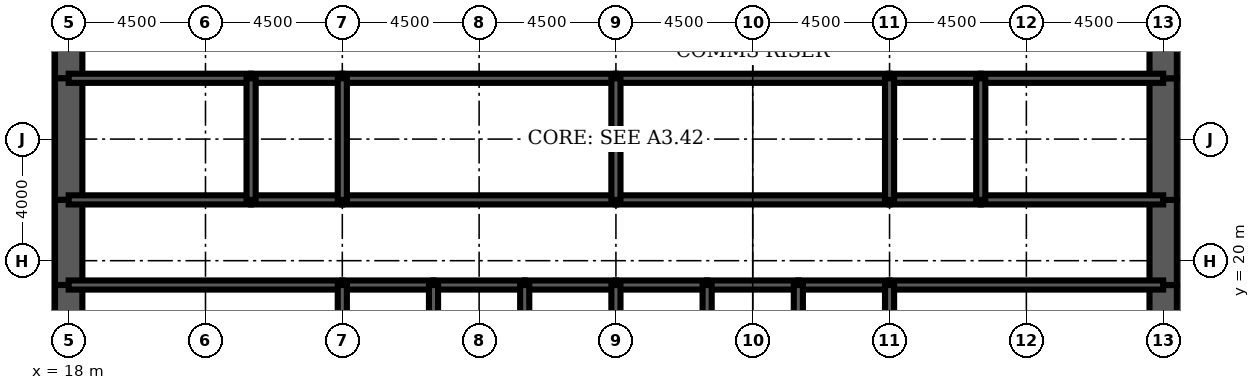
"""IFC4 building model, lengths in metres.
Left out: names, types, materials, properties, quantities, classifications, styles, units other than length and angle.
Written with IfcOpenShell. Run it as: python <this file> out.ifc"""

import sys

from ifc_helpers import new_model, si_unit, direction, frame, frame_2d, origin, place, context, subcontext, project, spatial, rectangle, extrude, element, fill, save


model = new_model("IFC4")
c1 = context("Model", 3, precision=1e-05, world=origin(), true_north=direction((0.0, 1.0)))
c2 = subcontext(c1, "Body", "Model", "MODEL_VIEW")
j1 = project(units=[si_unit("LENGTHUNIT", "METRE"), si_unit("PLANEANGLEUNIT", "RADIAN")], contexts=[c1])
p1 = place(None, origin())
s1 = spatial("IfcSite", under=j1, at=p1, CompositionType="ELEMENT")
p2 = place(p1, origin())
s2 = spatial("IfcBuilding", under=s1, at=p2, CompositionType="ELEMENT")
p3 = place(p2, frame((0.0, 0.0, 180.3)))
s3 = spatial("IfcBuildingStorey", under=s2, at=p3, CompositionType="ELEMENT", Elevation=180.3)
p4 = place(p3, frame((18.0, 28.8, 0.0), z_axis=(0.0, 0.0, 1.0), x_axis=(0.0, -1.0, 0.0)))
e1 = element("IfcWall", 1, at=p4, inside=s3, PredefinedType="SHEAR", context=c2, shape_type="SweptSolid", body=[
    extrude(rectangle(XDim=2.8, YDim=0.9, at=frame_2d((1.4, 0.0))), origin(), (0.0, 0.0, 1.0), 5.5),
])
p5 = place(p4, frame((0.4, 0.0, 0.0)))
e2 = element("IfcOpeningElement", 2, at=p5, cuts=e1, PredefinedType="OPENING", context=c2, shape_type="SweptSolid", body=[
    extrude(rectangle(XDim=1.8, YDim=2.1, at=frame_2d((0.9, 1.05))), frame((0.0, 0.46, 0.0), z_axis=(0.0, -1.0, 0.0), x_axis=(1.0, 0.0, 0.0)), (0.0, 0.0, 1.0), 0.92),
])
p6 = place(p3, frame((18.0, 26.0, 0.0), z_axis=(0.0, 0.0, 1.0), x_axis=(0.0, -1.0, 0.0)))
e3 = element("IfcWall", 3, at=p6, inside=s3, PredefinedType="SHEAR", context=c2, shape_type="SweptSolid", body=[
    extrude(rectangle(XDim=4.0, YDim=0.9, at=frame_2d((2.0, 0.0))), origin(), (0.0, 0.0, 1.0), 5.5),
])
p7 = place(p3, frame((18.0, 22.0, 0.0), z_axis=(0.0, 0.0, 1.0), x_axis=(0.0, -1.0, 0.0)))
e4 = element("IfcWall", 4, at=p7, inside=s3, PredefinedType="SHEAR", context=c2, shape_type="SweptSolid", body=[
    extrude(rectangle(XDim=2.8, YDim=0.9, at=frame_2d((1.4, 0.0))), origin(), (0.0, 0.0, 1.0), 5.5),
])
p8 = place(p7, frame((0.6, 0.0, 0.0)))
e5 = element("IfcOpeningElement", 5, at=p8, cuts=e4, PredefinedType="OPENING", context=c2, shape_type="SweptSolid", body=[
    extrude(rectangle(XDim=1.8, YDim=2.1, at=frame_2d((0.9, 1.05))), frame((0.0, 0.46, 0.0), z_axis=(0.0, -1.0, 0.0), x_axis=(1.0, 0.0, 0.0)), (0.0, 0.0, 1.0), 0.92),
])
for number, where, z_axis, x_axis in (
    (6, (18.0, 19.2, 0.0), (0.0, 0.0, 1.0), (0.0, -1.0, 0.0)),
    (7, (54.0, 16.0, 0.0), (0.0, 0.0, 1.0), (0.0, 1.0, 0.0)),
):
    element("IfcWall", number, at=place(p3, frame(where, z_axis=z_axis, x_axis=x_axis)), inside=s3, PredefinedType="SHEAR", context=c2, shape_type="SweptSolid", body=[
        extrude(rectangle(XDim=3.2, YDim=0.9, at=frame_2d((1.6, 0.0))), origin(), (0.0, 0.0, 1.0), 5.5),
    ])
p9 = place(p3, frame((54.0, 19.2, 0.0), z_axis=(0.0, 0.0, 1.0), x_axis=(0.0, 1.0, 0.0)))
e8 = element("IfcWall", 8, at=p9, inside=s3, PredefinedType="SHEAR", context=c2, shape_type="SweptSolid", body=[
    extrude(rectangle(XDim=2.8, YDim=0.9, at=frame_2d((1.4, 0.0))), origin(), (0.0, 0.0, 1.0), 5.5),
])
p10 = place(p9, frame((0.4, 0.0, 0.0)))
e9 = element("IfcOpeningElement", 9, at=p10, cuts=e8, PredefinedType="OPENING", context=c2, shape_type="SweptSolid", body=[
    extrude(rectangle(XDim=1.8, YDim=2.1, at=frame_2d((0.9, 1.05))), frame((0.0, 0.46, 0.0), z_axis=(0.0, -1.0, 0.0), x_axis=(1.0, 0.0, 0.0)), (0.0, 0.0, 1.0), 0.92),
])
p11 = place(p3, frame((54.0, 22.0, 0.0), z_axis=(0.0, 0.0, 1.0), x_axis=(0.0, 1.0, 0.0)))
e10 = element("IfcWall", 10, at=p11, inside=s3, PredefinedType="SHEAR", context=c2, shape_type="SweptSolid", body=[
    extrude(rectangle(XDim=4.0, YDim=0.9, at=frame_2d((2.0, 0.0))), origin(), (0.0, 0.0, 1.0), 5.5),
])
p12 = place(p3, frame((54.0, 26.0, 0.0), z_axis=(0.0, 0.0, 1.0), x_axis=(0.0, 1.0, 0.0)))
e11 = element("IfcWall", 11, at=p12, inside=s3, PredefinedType="SHEAR", context=c2, shape_type="SweptSolid", body=[
    extrude(rectangle(XDim=2.8, YDim=0.9, at=frame_2d((1.4, 0.0))), origin(), (0.0, 0.0, 1.0), 5.5),
])
p13 = place(p12, frame((0.6, 0.0, 0.0)))
e12 = element("IfcOpeningElement", 12, at=p13, cuts=e11, PredefinedType="OPENING", context=c2, shape_type="SweptSolid", body=[
    extrude(rectangle(XDim=1.8, YDim=2.1, at=frame_2d((0.9, 1.05))), frame((0.0, 0.46, 0.0), z_axis=(0.0, -1.0, 0.0), x_axis=(1.0, 0.0, 0.0)), (0.0, 0.0, 1.0), 0.92),
])
p14 = place(p3, frame((18.0, 19.2, 0.0), z_axis=(0.0, 0.0, 1.0), x_axis=(1.0, 0.0, 0.0)))
e13 = element("IfcWall", 13, at=p14, inside=s3, PredefinedType="SOLIDWALL", context=c2, shape_type="SweptSolid", body=[
    extrude(rectangle(XDim=9.0, YDim=0.3, at=frame_2d((4.5, 0.0))), origin(), (0.0, 0.0, 1.0), 5.5),
])
p15 = place(p14, frame((0.65, 0.0, 0.0)))
e14 = element("IfcOpeningElement", 14, at=p15, cuts=e13, PredefinedType="OPENING", context=c2, shape_type="SweptSolid", body=[
    extrude(rectangle(XDim=1.0, YDim=2.1, at=frame_2d((0.5, 1.05))), frame((0.0, 0.16, 0.0), z_axis=(0.0, -1.0, 0.0), x_axis=(1.0, 0.0, 0.0)), (0.0, 0.0, 1.0), 0.32),
])
p16 = place(p3, frame((27.0, 19.2, 0.0), z_axis=(0.0, 0.0, 1.0), x_axis=(1.0, 0.0, 0.0)))
e15 = element("IfcWall", 15, at=p16, inside=s3, PredefinedType="SOLIDWALL", context=c2, shape_type="SweptSolid", body=[
    extrude(rectangle(XDim=3.0, YDim=0.3, at=frame_2d((1.5, 0.0))), origin(), (0.0, 0.0, 1.0), 5.5),
])
p17 = place(p16, frame((0.95, 0.0, 0.0)))
e16 = element("IfcOpeningElement", 16, at=p17, cuts=e15, PredefinedType="OPENING", context=c2, shape_type="SweptSolid", body=[
    extrude(rectangle(XDim=1.1, YDim=2.2, at=frame_2d((0.55, 1.1))), frame((0.0, 0.16, 0.0), z_axis=(0.0, -1.0, 0.0), x_axis=(1.0, 0.0, 0.0)), (0.0, 0.0, 1.0), 0.32),
])
for number, where, z_axis, x_axis in (
    (17, (30.0, 19.2, 0.0), (0.0, 0.0, 1.0), (1.0, 0.0, 0.0)),
    (18, (33.0, 19.2, 0.0), (0.0, 0.0, 1.0), (1.0, 0.0, 0.0)),
    (19, (36.0, 19.2, 0.0), (0.0, 0.0, 1.0), (1.0, 0.0, 0.0)),
):
    element("IfcWall", number, at=place(p3, frame(where, z_axis=z_axis, x_axis=x_axis)), inside=s3, PredefinedType="SOLIDWALL", context=c2, shape_type="SweptSolid", body=[
        extrude(rectangle(XDim=3.0, YDim=0.3, at=frame_2d((1.5, 0.0))), origin(), (0.0, 0.0, 1.0), 5.5),
    ])
p18 = place(p3, frame((39.0, 19.2, 0.0), z_axis=(0.0, 0.0, 1.0), x_axis=(1.0, 0.0, 0.0)))
e20 = element("IfcWall", 20, at=p18, inside=s3, PredefinedType="SOLIDWALL", context=c2, shape_type="SweptSolid", body=[
    extrude(rectangle(XDim=3.0, YDim=0.3, at=frame_2d((1.5, 0.0))), origin(), (0.0, 0.0, 1.0), 5.5),
])
p19 = place(p18, frame((1.0, 0.0, 0.0)))
e21 = element("IfcOpeningElement", 21, at=p19, cuts=e20, PredefinedType="OPENING", context=c2, shape_type="SweptSolid", body=[
    extrude(rectangle(XDim=1.0, YDim=2.1, at=frame_2d((0.5, 1.05))), frame((0.0, 0.16, 0.0), z_axis=(0.0, -1.0, 0.0), x_axis=(1.0, 0.0, 0.0)), (0.0, 0.0, 1.0), 0.32),
])
p20 = place(p3, frame((42.0, 19.2, 0.0), z_axis=(0.0, 0.0, 1.0), x_axis=(1.0, 0.0, 0.0)))
e22 = element("IfcWall", 22, at=p20, inside=s3, PredefinedType="SOLIDWALL", context=c2, shape_type="SweptSolid", body=[
    extrude(rectangle(XDim=3.0, YDim=0.3, at=frame_2d((1.5, 0.0))), origin(), (0.0, 0.0, 1.0), 5.5),
])
p21 = place(p3, frame((45.0, 19.2, 0.0), z_axis=(0.0, 0.0, 1.0), x_axis=(1.0, 0.0, 0.0)))
e23 = element("IfcWall", 23, at=p21, inside=s3, PredefinedType="SOLIDWALL", context=c2, shape_type="SweptSolid", body=[
    extrude(rectangle(XDim=9.0, YDim=0.3, at=frame_2d((4.5, 0.0))), origin(), (0.0, 0.0, 1.0), 5.5),
])
p22 = place(p21, frame((7.35, 0.0, 0.0)))
e24 = element("IfcOpeningElement", 24, at=p22, cuts=e23, PredefinedType="OPENING", context=c2, shape_type="SweptSolid", body=[
    extrude(rectangle(XDim=1.0, YDim=2.1, at=frame_2d((0.5, 1.05))), frame((0.0, 0.16, 0.0), z_axis=(0.0, -1.0, 0.0), x_axis=(1.0, 0.0, 0.0)), (0.0, 0.0, 1.0), 0.32),
])
p23 = place(p3, frame((18.0, 22.0, 0.0), z_axis=(0.0, 0.0, 1.0), x_axis=(1.0, 0.0, 0.0)))
e25 = element("IfcWall", 25, at=p23, inside=s3, PredefinedType="SOLIDWALL", context=c2, shape_type="SweptSolid", body=[
    extrude(rectangle(XDim=6.0, YDim=0.3, at=frame_2d((3.0, 0.0))), origin(), (0.0, 0.0, 1.0), 5.5),
])
p24 = place(p23, frame((2.0, 0.0, 0.0)))
e26 = element("IfcOpeningElement", 26, at=p24, cuts=e25, PredefinedType="OPENING", context=c2, shape_type="SweptSolid", body=[
    extrude(rectangle(XDim=1.0, YDim=2.1, at=frame_2d((0.5, 1.05))), frame((0.0, 0.16, 0.0), z_axis=(0.0, -1.0, 0.0), x_axis=(1.0, 0.0, 0.0)), (0.0, 0.0, 1.0), 0.32),
])
p25 = place(p3, frame((24.0, 22.0, 0.0), z_axis=(0.0, 0.0, 1.0), x_axis=(1.0, 0.0, 0.0)))
e27 = element("IfcWall", 27, at=p25, inside=s3, PredefinedType="SOLIDWALL", context=c2, shape_type="SweptSolid", body=[
    extrude(rectangle(XDim=3.0, YDim=0.3, at=frame_2d((1.5, 0.0))), origin(), (0.0, 0.0, 1.0), 5.5),
])
p26 = place(p25, frame((1.0, 0.0, 0.0)))
e28 = element("IfcOpeningElement", 28, at=p26, cuts=e27, PredefinedType="OPENING", context=c2, shape_type="SweptSolid", body=[
    extrude(rectangle(XDim=1.0, YDim=2.1, at=frame_2d((0.5, 1.05))), frame((0.0, 0.16, 0.0), z_axis=(0.0, -1.0, 0.0), x_axis=(1.0, 0.0, 0.0)), (0.0, 0.0, 1.0), 0.32),
])
p27 = place(p3, frame((27.0, 22.0, 0.0), z_axis=(0.0, 0.0, 1.0), x_axis=(1.0, 0.0, 0.0)))
e29 = element("IfcWall", 29, at=p27, inside=s3, PredefinedType="SOLIDWALL", context=c2, shape_type="SweptSolid", body=[
    extrude(rectangle(XDim=9.0, YDim=0.3, at=frame_2d((4.5, 0.0))), origin(), (0.0, 0.0, 1.0), 5.5),
])
p28 = place(p27, frame((4.0, 0.0, 0.0)))
e30 = element("IfcOpeningElement", 30, at=p28, cuts=e29, PredefinedType="OPENING", context=c2, shape_type="SweptSolid", body=[
    extrude(rectangle(XDim=1.0, YDim=2.1, at=frame_2d((0.5, 1.05))), frame((0.0, 0.16, 0.0), z_axis=(0.0, -1.0, 0.0), x_axis=(1.0, 0.0, 0.0)), (0.0, 0.0, 1.0), 0.32),
])
p29 = place(p3, frame((36.0, 22.0, 0.0), z_axis=(0.0, 0.0, 1.0), x_axis=(1.0, 0.0, 0.0)))
e31 = element("IfcWall", 31, at=p29, inside=s3, PredefinedType="SOLIDWALL", context=c2, shape_type="SweptSolid", body=[
    extrude(rectangle(XDim=9.0, YDim=0.3, at=frame_2d((4.5, 0.0))), origin(), (0.0, 0.0, 1.0), 5.5),
])
p30 = place(p29, frame((4.0, 0.0, 0.0)))
e32 = element("IfcOpeningElement", 32, at=p30, cuts=e31, PredefinedType="OPENING", context=c2, shape_type="SweptSolid", body=[
    extrude(rectangle(XDim=1.0, YDim=2.1, at=frame_2d((0.5, 1.05))), frame((0.0, 0.16, 0.0), z_axis=(0.0, -1.0, 0.0), x_axis=(1.0, 0.0, 0.0)), (0.0, 0.0, 1.0), 0.32),
])
p31 = place(p3, frame((45.0, 22.0, 0.0), z_axis=(0.0, 0.0, 1.0), x_axis=(1.0, 0.0, 0.0)))
e33 = element("IfcWall", 33, at=p31, inside=s3, PredefinedType="SOLIDWALL", context=c2, shape_type="SweptSolid", body=[
    extrude(rectangle(XDim=3.0, YDim=0.3, at=frame_2d((1.5, 0.0))), origin(), (0.0, 0.0, 1.0), 5.5),
])
p32 = place(p31, frame((1.0, 0.0, 0.0)))
e34 = element("IfcOpeningElement", 34, at=p32, cuts=e33, PredefinedType="OPENING", context=c2, shape_type="SweptSolid", body=[
    extrude(rectangle(XDim=1.0, YDim=2.1, at=frame_2d((0.5, 1.05))), frame((0.0, 0.16, 0.0), z_axis=(0.0, -1.0, 0.0), x_axis=(1.0, 0.0, 0.0)), (0.0, 0.0, 1.0), 0.32),
])
p33 = place(p3, frame((48.0, 22.0, 0.0), z_axis=(0.0, 0.0, 1.0), x_axis=(1.0, 0.0, 0.0)))
e35 = element("IfcWall", 35, at=p33, inside=s3, PredefinedType="SOLIDWALL", context=c2, shape_type="SweptSolid", body=[
    extrude(rectangle(XDim=6.0, YDim=0.3, at=frame_2d((3.0, 0.0))), origin(), (0.0, 0.0, 1.0), 5.5),
])
p34 = place(p33, frame((2.0, 0.0, 0.0)))
e36 = element("IfcOpeningElement", 36, at=p34, cuts=e35, PredefinedType="OPENING", context=c2, shape_type="SweptSolid", body=[
    extrude(rectangle(XDim=1.0, YDim=2.1, at=frame_2d((0.5, 1.05))), frame((0.0, 0.16, 0.0), z_axis=(0.0, -1.0, 0.0), x_axis=(1.0, 0.0, 0.0)), (0.0, 0.0, 1.0), 0.32),
])
p35 = place(p33, frame((4.3, 0.0, 0.0)))
e37 = element("IfcOpeningElement", 37, at=p35, cuts=e35, PredefinedType="OPENING", context=c2, shape_type="SweptSolid", body=[
    extrude(rectangle(XDim=1.0, YDim=2.1, at=frame_2d((0.5, 1.05))), frame((0.0, 0.16, 0.0), z_axis=(0.0, -1.0, 0.0), x_axis=(1.0, 0.0, 0.0)), (0.0, 0.0, 1.0), 0.32),
])
p36 = place(p3, frame((18.0, 26.0, 0.0), z_axis=(0.0, 0.0, 1.0), x_axis=(1.0, 0.0, 0.0)))
e38 = element("IfcWall", 38, at=p36, inside=s3, PredefinedType="SOLIDWALL", context=c2, shape_type="SweptSolid", body=[
    extrude(rectangle(XDim=6.0, YDim=0.3, at=frame_2d((3.0, 0.0))), origin(), (0.0, 0.0, 1.0), 5.5),
])
p37 = place(p3, frame((24.0, 26.0, 0.0), z_axis=(0.0, 0.0, 1.0), x_axis=(1.0, 0.0, 0.0)))
e39 = element("IfcWall", 39, at=p37, inside=s3, PredefinedType="SOLIDWALL", context=c2, shape_type="SweptSolid", body=[
    extrude(rectangle(XDim=3.0, YDim=0.3, at=frame_2d((1.5, 0.0))), origin(), (0.0, 0.0, 1.0), 5.5),
])
for number, where, z_axis, x_axis in (
    (40, (27.0, 26.0, 0.0), (0.0, 0.0, 1.0), (1.0, 0.0, 0.0)),
    (41, (36.0, 26.0, 0.0), (0.0, 0.0, 1.0), (1.0, 0.0, 0.0)),
):
    element("IfcWall", number, at=place(p3, frame(where, z_axis=z_axis, x_axis=x_axis)), inside=s3, PredefinedType="SOLIDWALL", context=c2, shape_type="SweptSolid", body=[
        extrude(rectangle(XDim=9.0, YDim=0.3, at=frame_2d((4.5, 0.0))), origin(), (0.0, 0.0, 1.0), 5.5),
    ])
p38 = place(p3, frame((45.0, 26.0, 0.0), z_axis=(0.0, 0.0, 1.0), x_axis=(1.0, 0.0, 0.0)))
e42 = element("IfcWall", 42, at=p38, inside=s3, PredefinedType="SOLIDWALL", context=c2, shape_type="SweptSolid", body=[
    extrude(rectangle(XDim=3.0, YDim=0.3, at=frame_2d((1.5, 0.0))), origin(), (0.0, 0.0, 1.0), 5.5),
])
p39 = place(p3, frame((48.0, 26.0, 0.0), z_axis=(0.0, 0.0, 1.0), x_axis=(1.0, 0.0, 0.0)))
e43 = element("IfcWall", 43, at=p39, inside=s3, PredefinedType="SOLIDWALL", context=c2, shape_type="SweptSolid", body=[
    extrude(rectangle(XDim=6.0, YDim=0.3, at=frame_2d((3.0, 0.0))), origin(), (0.0, 0.0, 1.0), 5.5),
])
for number, where, z_axis, x_axis in (
    (44, (27.0, 16.0, 0.0), (0.0, 0.0, 1.0), (0.0, 1.0, 0.0)),
    (45, (30.0, 16.0, 0.0), (0.0, 0.0, 1.0), (0.0, 1.0, 0.0)),
    (46, (33.0, 16.0, 0.0), (0.0, 0.0, 1.0), (0.0, 1.0, 0.0)),
    (47, (36.0, 16.0, 0.0), (0.0, 0.0, 1.0), (0.0, 1.0, 0.0)),
    (48, (39.0, 16.0, 0.0), (0.0, 0.0, 1.0), (0.0, 1.0, 0.0)),
    (49, (42.0, 16.0, 0.0), (0.0, 0.0, 1.0), (0.0, 1.0, 0.0)),
    (50, (45.0, 16.0, 0.0), (0.0, 0.0, 1.0), (0.0, 1.0, 0.0)),
):
    element("IfcWall", number, at=place(p3, frame(where, z_axis=z_axis, x_axis=x_axis)), inside=s3, PredefinedType="SOLIDWALL", context=c2, shape_type="SweptSolid", body=[
        extrude(rectangle(XDim=3.2, YDim=0.3, at=frame_2d((1.6, 0.0))), origin(), (0.0, 0.0, 1.0), 5.5),
    ])
for number, where, z_axis, x_axis in (
    (51, (24.0, 22.0, 0.0), (0.0, 0.0, 1.0), (0.0, 1.0, 0.0)),
    (52, (27.0, 22.0, 0.0), (0.0, 0.0, 1.0), (0.0, 1.0, 0.0)),
    (53, (36.0, 22.0, 0.0), (0.0, 0.0, 1.0), (0.0, 1.0, 0.0)),
    (54, (45.0, 22.0, 0.0), (0.0, 0.0, 1.0), (0.0, 1.0, 0.0)),
    (55, (48.0, 22.0, 0.0), (0.0, 0.0, 1.0), (0.0, 1.0, 0.0)),
):
    element("IfcWall", number, at=place(p3, frame(where, z_axis=z_axis, x_axis=x_axis)), inside=s3, PredefinedType="SOLIDWALL", context=c2, shape_type="SweptSolid", body=[
        extrude(rectangle(XDim=4.0, YDim=0.3, at=frame_2d((2.0, 0.0))), origin(), (0.0, 0.0, 1.0), 5.5),
    ])
p40 = place(p3, frame((38.0, 22.15, 0.0), z_axis=(0.0, 0.0, 1.0), x_axis=(0.0, 1.0, 0.0)))
e56 = element("IfcWall", 56, at=p40, inside=s3, PredefinedType="PARTITIONING", context=c2, shape_type="SweptSolid", body=[
    extrude(rectangle(XDim=3.7, YDim=0.15, at=frame_2d((1.85, 0.0))), origin(), (0.0, 0.0, 1.0), 3.0),
])
p41 = place(p40, frame((2.2, 0.0, 0.0)))
e57 = element("IfcOpeningElement", 57, at=p41, cuts=e56, PredefinedType="OPENING", context=c2, shape_type="SweptSolid", body=[
    extrude(rectangle(XDim=1.0, YDim=2.1, at=frame_2d((0.5, 1.05))), frame((0.0, 0.085, 0.0), z_axis=(0.0, -1.0, 0.0), x_axis=(1.0, 0.0, 0.0)), (0.0, 0.0, 1.0), 0.17),
])
p42 = place(p3, frame((51.975, 22.15, 0.0), z_axis=(0.0, 0.0, 1.0), x_axis=(0.0, 1.0, 0.0)))
e58 = element("IfcWall", 58, at=p42, inside=s3, PredefinedType="PARTITIONING", context=c2, shape_type="SweptSolid", body=[
    extrude(rectangle(XDim=3.7, YDim=0.15, at=frame_2d((1.85, 0.0))), origin(), (0.0, 0.0, 1.0), 3.0),
])
p43 = place(p41, origin())
e59 = element("IfcDoor", 59, at=p43, inside=s3, OperationType="SINGLE_SWING_RIGHT", PredefinedType="DOOR", context=c2, shape_type="SweptSolid", body=[
    extrude(rectangle(XDim=1.0, YDim=2.1, at=frame_2d((0.5, 1.05))), frame((0.0, 0.025, 0.0), z_axis=(0.0, -1.0, 0.0), x_axis=(1.0, 0.0, 0.0)), (0.0, 0.0, 1.0), 0.05),
])
fill(e57, e59)
p44 = place(p17, origin())
e60 = element("IfcDoor", 60, at=p44, inside=s3, OperationType="DOUBLE_DOOR_SLIDING", PredefinedType="USERDEFINED", context=c2, shape_type="SweptSolid", body=[
    extrude(rectangle(XDim=1.1, YDim=2.2, at=frame_2d((0.55, 1.1))), frame((0.0, 0.025, 0.0), z_axis=(0.0, -1.0, 0.0), x_axis=(1.0, 0.0, 0.0)), (0.0, 0.0, 1.0), 0.05),
])
fill(e16, e60)
p45 = place(p15, origin())
e61 = element("IfcDoor", 61, at=p45, inside=s3, OperationType="SINGLE_SWING_LEFT", PredefinedType="DOOR", context=c2, shape_type="SweptSolid", body=[
    extrude(rectangle(XDim=1.0, YDim=2.1, at=frame_2d((0.5, 1.05))), frame((0.0, 0.025, 0.0), z_axis=(0.0, -1.0, 0.0), x_axis=(1.0, 0.0, 0.0)), (0.0, 0.0, 1.0), 0.05),
])
fill(e14, e61)
p46 = place(p22, origin())
e62 = element("IfcDoor", 62, at=p46, inside=s3, OperationType="SINGLE_SWING_RIGHT", PredefinedType="DOOR", context=c2, shape_type="SweptSolid", body=[
    extrude(rectangle(XDim=1.0, YDim=2.1, at=frame_2d((0.5, 1.05))), frame((0.0, 0.025, 0.0), z_axis=(0.0, -1.0, 0.0), x_axis=(1.0, 0.0, 0.0)), (0.0, 0.0, 1.0), 0.05),
])
fill(e24, e62)
p47 = place(p8, origin())
e63 = element("IfcDoor", 63, at=p47, inside=s3, OperationType="SINGLE_SWING_LEFT", PredefinedType="DOOR", context=c2, shape_type="SweptSolid", body=[
    extrude(rectangle(XDim=1.8, YDim=2.1, at=frame_2d((0.9, 1.05))), frame((0.0, 0.45, 0.0), z_axis=(0.0, -1.0, 0.0), x_axis=(1.0, 0.0, 0.0)), (0.0, 0.0, 1.0), 0.899),
])
fill(e5, e63)
p48 = place(p5, origin())
e64 = element("IfcDoor", 64, at=p48, inside=s3, OperationType="SINGLE_SWING_LEFT", PredefinedType="DOOR", context=c2, shape_type="SweptSolid", body=[
    extrude(rectangle(XDim=1.8, YDim=2.1, at=frame_2d((0.9, 1.05))), frame((0.0, 0.45, 0.0), z_axis=(0.0, -1.0, 0.0), x_axis=(1.0, 0.0, 0.0)), (0.0, 0.0, 1.0), 0.899),
])
fill(e2, e64)
p49 = place(p10, origin())
e65 = element("IfcDoor", 65, at=p49, inside=s3, OperationType="SINGLE_SWING_LEFT", PredefinedType="DOOR", context=c2, shape_type="SweptSolid", body=[
    extrude(rectangle(XDim=1.8, YDim=2.1, at=frame_2d((0.9, 1.05))), frame((0.0, 0.45, 0.0), z_axis=(0.0, -1.0, 0.0), x_axis=(1.0, 0.0, 0.0)), (0.0, 0.0, 1.0), 0.899),
])
fill(e9, e65)
p50 = place(p13, origin())
e66 = element("IfcDoor", 66, at=p50, inside=s3, OperationType="SINGLE_SWING_LEFT", PredefinedType="DOOR", context=c2, shape_type="SweptSolid", body=[
    extrude(rectangle(XDim=1.8, YDim=2.1, at=frame_2d((0.9, 1.05))), frame((0.0, 0.45, 0.0), z_axis=(0.0, -1.0, 0.0), x_axis=(1.0, 0.0, 0.0)), (0.0, 0.0, 1.0), 0.899),
])
fill(e12, e66)
p51 = place(p24, origin())
e67 = element("IfcDoor", 67, at=p51, inside=s3, OperationType="SINGLE_SWING_LEFT", PredefinedType="DOOR", context=c2, shape_type="SweptSolid", body=[
    extrude(rectangle(XDim=1.0, YDim=2.1, at=frame_2d((0.5, 1.05))), frame((0.0, 0.025, 0.0), z_axis=(0.0, -1.0, 0.0), x_axis=(1.0, 0.0, 0.0)), (0.0, 0.0, 1.0), 0.05),
])
fill(e26, e67)
p52 = place(p26, origin())
e68 = element("IfcDoor", 68, at=p52, inside=s3, OperationType="SINGLE_SWING_LEFT", PredefinedType="DOOR", context=c2, shape_type="SweptSolid", body=[
    extrude(rectangle(XDim=1.0, YDim=2.1, at=frame_2d((0.5, 1.05))), frame((0.0, 0.025, 0.0), z_axis=(0.0, -1.0, 0.0), x_axis=(1.0, 0.0, 0.0)), (0.0, 0.0, 1.0), 0.05),
])
fill(e28, e68)
p53 = place(p28, origin())
e69 = element("IfcDoor", 69, at=p53, inside=s3, OperationType="SINGLE_SWING_LEFT", PredefinedType="DOOR", context=c2, shape_type="SweptSolid", body=[
    extrude(rectangle(XDim=1.0, YDim=2.1, at=frame_2d((0.5, 1.05))), frame((0.0, 0.025, 0.0), z_axis=(0.0, -1.0, 0.0), x_axis=(1.0, 0.0, 0.0)), (0.0, 0.0, 1.0), 0.05),
])
fill(e30, e69)
p54 = place(p30, origin())
e70 = element("IfcDoor", 70, at=p54, inside=s3, OperationType="SINGLE_SWING_LEFT", PredefinedType="DOOR", context=c2, shape_type="SweptSolid", body=[
    extrude(rectangle(XDim=1.0, YDim=2.1, at=frame_2d((0.5, 1.05))), frame((0.0, 0.025, 0.0), z_axis=(0.0, -1.0, 0.0), x_axis=(1.0, 0.0, 0.0)), (0.0, 0.0, 1.0), 0.05),
])
fill(e32, e70)
p55 = place(p32, origin())
e71 = element("IfcDoor", 71, at=p55, inside=s3, OperationType="SINGLE_SWING_LEFT", PredefinedType="DOOR", context=c2, shape_type="SweptSolid", body=[
    extrude(rectangle(XDim=1.0, YDim=2.1, at=frame_2d((0.5, 1.05))), frame((0.0, 0.025, 0.0), z_axis=(0.0, -1.0, 0.0), x_axis=(1.0, 0.0, 0.0)), (0.0, 0.0, 1.0), 0.05),
])
fill(e34, e71)
p56 = place(p34, origin())
e72 = element("IfcDoor", 72, at=p56, inside=s3, OperationType="SINGLE_SWING_LEFT", PredefinedType="DOOR", context=c2, shape_type="SweptSolid", body=[
    extrude(rectangle(XDim=1.0, YDim=2.1, at=frame_2d((0.5, 1.05))), frame((0.0, 0.025, 0.0), z_axis=(0.0, -1.0, 0.0), x_axis=(1.0, 0.0, 0.0)), (0.0, 0.0, 1.0), 0.05),
])
fill(e36, e72)
p57 = place(p35, origin())
e73 = element("IfcDoor", 73, at=p57, inside=s3, OperationType="SINGLE_SWING_RIGHT", PredefinedType="DOOR", context=c2, shape_type="SweptSolid", body=[
    extrude(rectangle(XDim=1.0, YDim=2.1, at=frame_2d((0.5, 1.05))), frame((0.0, 0.025, 0.0), z_axis=(0.0, -1.0, 0.0), x_axis=(1.0, 0.0, 0.0)), (0.0, 0.0, 1.0), 0.05),
])
fill(e37, e73)
p58 = place(p19, origin())
e74 = element("IfcDoor", 74, at=p58, inside=s3, OperationType="SINGLE_SWING_LEFT", PredefinedType="DOOR", context=c2, shape_type="SweptSolid", body=[
    extrude(rectangle(XDim=1.0, YDim=2.1, at=frame_2d((0.5, 1.05))), frame((0.0, 0.025, 0.0), z_axis=(0.0, -1.0, 0.0), x_axis=(1.0, 0.0, 0.0)), (0.0, 0.0, 1.0), 0.05),
])
fill(e21, e74)
save(model, sys.argv[1])
